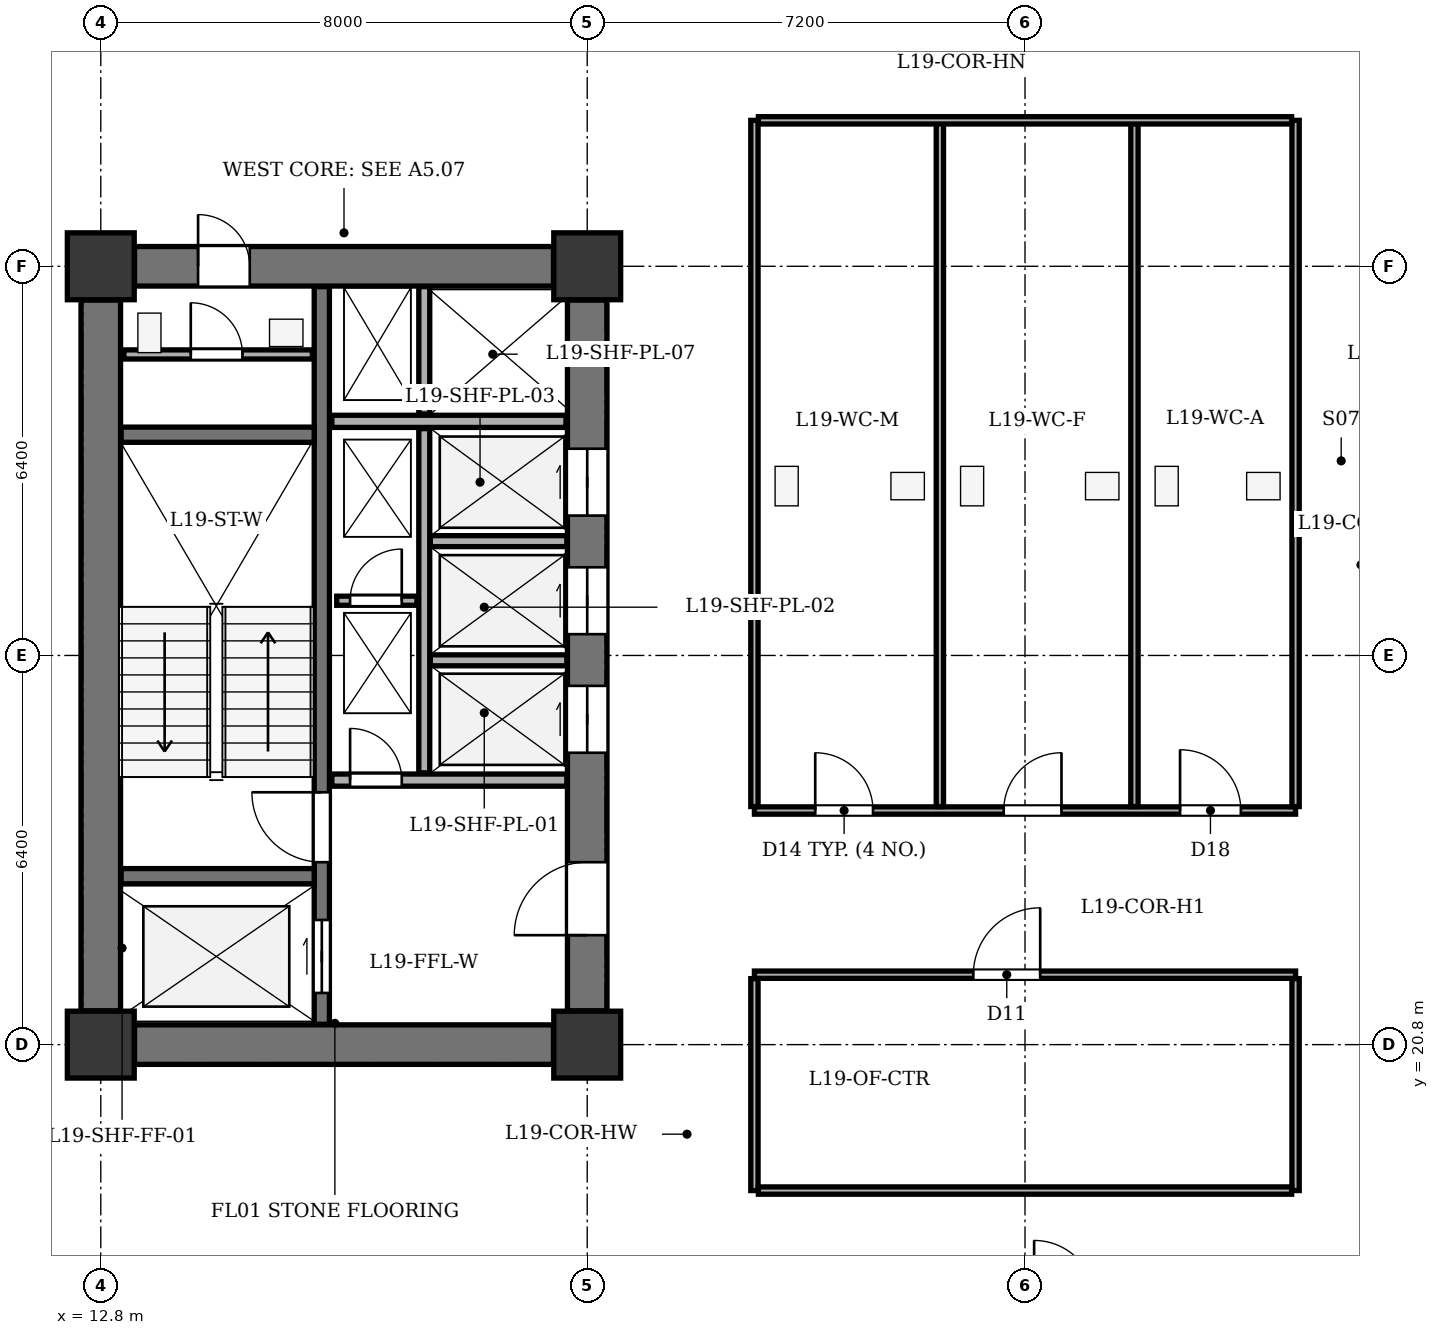
"""IFC4 building model, lengths in metres.
Left out: names, types, materials, properties, quantities, classifications, styles, units other than length and angle.
Written with IfcOpenShell. Run it as: python <this file> out.ifc"""

import sys

from ifc_helpers import new_model, si_unit, direction, frame, frame_2d, origin, origin_2d, place, context, subcontext, project, spatial, rectangle, extrude, element, fill, save


model = new_model("IFC4")
c1 = context("Model", 3, precision=1e-05, world=origin(), true_north=direction((0.0, 1.0)))
c2 = subcontext(c1, "Body", "Model", "MODEL_VIEW")
j1 = project(units=[si_unit("LENGTHUNIT", "METRE"), si_unit("PLANEANGLEUNIT", "RADIAN")], contexts=[c1])
p1 = place(None, origin())
s1 = spatial("IfcSite", under=j1, at=p1, CompositionType="ELEMENT")
p2 = place(p1, origin())
s2 = spatial("IfcBuilding", under=s1, at=p2, CompositionType="ELEMENT")
p3 = place(p2, frame((0.0, 0.0, 78.9)))
s3 = spatial("IfcBuildingStorey", under=s2, at=p3, CompositionType="ELEMENT", Elevation=78.9)
for number, where, z_axis, x_axis in (
    (1, (12.8, 20.8, 0.0), (0.0, 0.0, 1.0), (1.0, 0.0, 0.0)),
    (2, (20.8, 20.8, 0.0), (0.0, 0.0, 1.0), (1.0, 0.0, 0.0)),
    (3, (12.8, 33.6, 0.0), (0.0, 0.0, 1.0), (1.0, 0.0, 0.0)),
    (4, (20.8, 33.6, 0.0), (0.0, 0.0, 1.0), (1.0, 0.0, 0.0)),
):
    element("IfcColumn", number, at=place(p3, frame(where, z_axis=z_axis, x_axis=x_axis)), inside=s3, PredefinedType="COLUMN", context=c2, shape_type="SweptSolid", body=[
        extrude(rectangle(XDim=1.1, YDim=1.1, at=origin_2d()), origin(), (0.0, 0.0, 1.0), 3.9),
    ])
p4 = place(p3, frame((12.8, 21.355, 0.0), z_axis=(0.0, 0.0, 1.0), x_axis=(0.0, 1.0, 0.0)))
e5 = element("IfcWall", 5, at=p4, inside=s3, PredefinedType="SHEAR", context=c2, shape_type="SweptSolid", body=[
    extrude(rectangle(XDim=11.69, YDim=0.65, at=frame_2d((5.845, 0.0))), origin(), (0.0, 0.0, 1.0), 3.6),
])
p5 = place(p3, frame((13.355, 20.8, 0.0), z_axis=(0.0, 0.0, 1.0), x_axis=(1.0, 0.0, 0.0)))
e6 = element("IfcWall", 6, at=p5, inside=s3, PredefinedType="SHEAR", context=c2, shape_type="SweptSolid", body=[
    extrude(rectangle(XDim=6.89, YDim=0.65, at=frame_2d((3.445, 0.0))), origin(), (0.0, 0.0, 1.0), 3.6),
])
p6 = place(p3, frame((13.355, 33.6, 0.0), z_axis=(0.0, 0.0, 1.0), x_axis=(1.0, 0.0, 0.0)))
e7 = element("IfcWall", 7, at=p6, inside=s3, PredefinedType="SHEAR", context=c2, shape_type="SweptSolid", body=[
    extrude(rectangle(XDim=6.89, YDim=0.65, at=frame_2d((3.445, 0.0))), origin(), (0.0, 0.0, 1.0), 3.6),
])
p7 = place(p6, frame((1.045, 0.0, 0.0)))
e8 = element("IfcOpeningElement", 8, at=p7, cuts=e7, PredefinedType="OPENING", context=c2, shape_type="SweptSolid", body=[
    extrude(rectangle(XDim=0.85, YDim=2.02, at=frame_2d((0.425, 1.01))), frame((0.0, 0.335, 0.0), z_axis=(0.0, -1.0, 0.0), x_axis=(1.0, 0.0, 0.0)), (0.0, 0.0, 1.0), 0.67),
])
p8 = place(p3, frame((20.8, 21.355, 0.0), z_axis=(0.0, 0.0, 1.0), x_axis=(0.0, 1.0, 0.0)))
e9 = element("IfcWall", 9, at=p8, inside=s3, PredefinedType="SHEAR", context=c2, shape_type="SweptSolid", body=[
    extrude(rectangle(XDim=11.69, YDim=0.65, at=frame_2d((5.845, 0.0))), origin(), (0.0, 0.0, 1.0), 3.6),
])
p9 = place(p8, frame((1.245, 0.0, 0.0)))
e10 = element("IfcOpeningElement", 10, at=p9, cuts=e9, PredefinedType="OPENING", context=c2, shape_type="SweptSolid", body=[
    extrude(rectangle(XDim=1.2, YDim=2.15, at=frame_2d((0.6, 1.075))), frame((0.0, 0.335, 0.0), z_axis=(0.0, -1.0, 0.0), x_axis=(1.0, 0.0, 0.0)), (0.0, 0.0, 1.0), 0.67),
])
p10 = place(p8, frame((4.245, 0.0, 0.0)))
e11 = element("IfcOpeningElement", 11, at=p10, cuts=e9, PredefinedType="OPENING", context=c2, shape_type="SweptSolid", body=[
    extrude(rectangle(XDim=1.1, YDim=2.1, at=frame_2d((0.55, 1.05))), frame((0.0, 0.335, 0.0), z_axis=(0.0, -1.0, 0.0), x_axis=(1.0, 0.0, 0.0)), (0.0, 0.0, 1.0), 0.67),
])
p11 = place(p8, frame((6.195, 0.0, 0.0)))
e12 = element("IfcOpeningElement", 12, at=p11, cuts=e9, PredefinedType="OPENING", context=c2, shape_type="SweptSolid", body=[
    extrude(rectangle(XDim=1.1, YDim=2.1, at=frame_2d((0.55, 1.05))), frame((0.0, 0.335, 0.0), z_axis=(0.0, -1.0, 0.0), x_axis=(1.0, 0.0, 0.0)), (0.0, 0.0, 1.0), 0.67),
])
p12 = place(p8, frame((8.145, 0.0, 0.0)))
e13 = element("IfcOpeningElement", 13, at=p12, cuts=e9, PredefinedType="OPENING", context=c2, shape_type="SweptSolid", body=[
    extrude(rectangle(XDim=1.1, YDim=2.1, at=frame_2d((0.55, 1.05))), frame((0.0, 0.335, 0.0), z_axis=(0.0, -1.0, 0.0), x_axis=(1.0, 0.0, 0.0)), (0.0, 0.0, 1.0), 0.67),
])
p13 = place(p3, frame((16.435, 21.135, 0.0), z_axis=(0.0, 0.0, 1.0), x_axis=(0.0, 1.0, 0.0)))
e14 = element("IfcWall", 14, at=p13, inside=s3, PredefinedType="SHEAR", context=c2, shape_type="SweptSolid", body=[
    extrude(rectangle(XDim=12.13, YDim=0.25, at=frame_2d((6.065, 0.0))), origin(), (0.0, 0.0, 1.0), 3.6),
])
p14 = place(p13, frame((0.515, 0.0, 0.0)))
e15 = element("IfcOpeningElement", 15, at=p14, cuts=e14, PredefinedType="OPENING", context=c2, shape_type="SweptSolid", body=[
    extrude(rectangle(XDim=1.2, YDim=2.15, at=frame_2d((0.6, 1.075))), frame((0.0, 0.135, 0.0), z_axis=(0.0, -1.0, 0.0), x_axis=(1.0, 0.0, 0.0)), (0.0, 0.0, 1.0), 0.27),
])
p15 = place(p13, frame((2.665, 0.0, 0.0)))
e16 = element("IfcOpeningElement", 16, at=p15, cuts=e14, PredefinedType="OPENING", context=c2, shape_type="SweptSolid", body=[
    extrude(rectangle(XDim=1.15, YDim=2.15, at=frame_2d((0.575, 1.075))), frame((0.0, 0.135, 0.0), z_axis=(0.0, -1.0, 0.0), x_axis=(1.0, 0.0, 0.0)), (0.0, 0.0, 1.0), 0.27),
])
for number, where, z_axis, x_axis in (
    (17, (13.135, 23.57, 0.0), (0.0, 0.0, 1.0), (1.0, 0.0, 0.0)),
    (18, (13.135, 30.83, 0.0), (0.0, 0.0, 1.0), (1.0, 0.0, 0.0)),
):
    element("IfcWall", number, at=place(p3, frame(where, z_axis=z_axis, x_axis=x_axis)), inside=s3, PredefinedType="SHEAR", context=c2, shape_type="SweptSolid", body=[
        extrude(rectangle(XDim=3.175, YDim=0.25, at=frame_2d((1.587, 0.0))), origin(), (0.0, 0.0, 1.0), 3.6),
    ])
p16 = place(p3, frame((16.6, 25.15, 0.0), z_axis=(0.0, 0.0, 1.0), x_axis=(1.0, 0.0, 0.0)))
e19 = element("IfcWall", 19, at=p16, inside=s3, PredefinedType="SOLIDWALL", context=c2, shape_type="SweptSolid", body=[
    extrude(rectangle(XDim=3.865, YDim=0.2, at=frame_2d((1.933, 0.0))), origin(), (0.0, 0.0, 1.0), 3.6),
])
p17 = place(p16, frame((0.3, 0.0, 0.0)))
e20 = element("IfcOpeningElement", 20, at=p17, cuts=e19, PredefinedType="OPENING", context=c2, shape_type="SweptSolid", body=[
    extrude(rectangle(XDim=0.85, YDim=2.02, at=frame_2d((0.425, 1.01))), frame((0.0, 0.11, 0.0), z_axis=(0.0, -1.0, 0.0), x_axis=(1.0, 0.0, 0.0)), (0.0, 0.0, 1.0), 0.22),
])
p18 = place(p3, frame((16.6, 31.05, 0.0), z_axis=(0.0, 0.0, 1.0), x_axis=(1.0, 0.0, 0.0)))
e21 = element("IfcWall", 21, at=p18, inside=s3, PredefinedType="SOLIDWALL", context=c2, shape_type="SweptSolid", body=[
    extrude(rectangle(XDim=3.85, YDim=0.2, at=frame_2d((1.925, 0.0))), origin(), (0.0, 0.0, 1.0), 3.6),
])
p19 = place(p3, frame((18.12, 25.27, 0.0), z_axis=(0.0, 0.0, 1.0), x_axis=(0.0, 1.0, 0.0)))
e22 = element("IfcWall", 22, at=p19, inside=s3, PredefinedType="PARTITIONING", context=c2, shape_type="SweptSolid", body=[
    extrude(rectangle(XDim=5.66, YDim=0.18, at=frame_2d((2.83, 0.0))), origin(), (0.0, 0.0, 1.0), 3.6),
])
p20 = place(p3, frame((18.12, 31.17, 0.0), z_axis=(0.0, 0.0, 1.0), x_axis=(0.0, 1.0, 0.0)))
e23 = element("IfcWall", 23, at=p20, inside=s3, PredefinedType="PARTITIONING", context=c2, shape_type="SweptSolid", body=[
    extrude(rectangle(XDim=2.095, YDim=0.18, at=frame_2d((1.047, 0.0))), origin(), (0.0, 0.0, 1.0), 3.6),
])
for number, where, z_axis, x_axis in (
    (24, (18.22, 27.12, 0.0), (0.0, 0.0, 1.0), (1.0, 0.0, 0.0)),
    (25, (18.22, 29.08, 0.0), (0.0, 0.0, 1.0), (1.0, 0.0, 0.0)),
):
    element("IfcWall", number, at=place(p3, frame(where, z_axis=z_axis, x_axis=x_axis)), inside=s3, PredefinedType="PARTITIONING", context=c2, shape_type="SweptSolid", body=[
        extrude(rectangle(XDim=2.245, YDim=0.18, at=frame_2d((1.123, 0.0))), origin(), (0.0, 0.0, 1.0), 3.6),
    ])
p21 = place(p3, frame((13.18, 32.15, 0.0), z_axis=(0.0, 0.0, 1.0), x_axis=(1.0, 0.0, 0.0)))
e26 = element("IfcWall", 26, at=p21, inside=s3, PredefinedType="PARTITIONING", context=c2, shape_type="SweptSolid", body=[
    extrude(rectangle(XDim=3.1, YDim=0.15, at=frame_2d((1.55, 0.0))), origin(), (0.0, 0.0, 1.0), 3.6),
])
p22 = place(p21, frame((1.1, 0.0, 0.0)))
e27 = element("IfcOpeningElement", 27, at=p22, cuts=e26, PredefinedType="OPENING", context=c2, shape_type="SweptSolid", body=[
    extrude(rectangle(XDim=0.85, YDim=2.02, at=frame_2d((0.425, 1.01))), frame((0.0, 0.085, 0.0), z_axis=(0.0, -1.0, 0.0), x_axis=(1.0, 0.0, 0.0)), (0.0, 0.0, 1.0), 0.17),
])
p23 = place(p3, frame((16.68, 28.1, 0.0), z_axis=(0.0, 0.0, 1.0), x_axis=(1.0, 0.0, 0.0)))
e28 = element("IfcWall", 28, at=p23, inside=s3, PredefinedType="PARTITIONING", context=c2, shape_type="SweptSolid", body=[
    extrude(rectangle(XDim=1.32, YDim=0.15, at=frame_2d((0.66, 0.0))), origin(), (0.0, 0.0, 1.0), 3.6),
])
p24 = place(p23, frame((0.22, 0.0, 0.0)))
e29 = element("IfcOpeningElement", 29, at=p24, cuts=e28, PredefinedType="OPENING", context=c2, shape_type="SweptSolid", body=[
    extrude(rectangle(XDim=0.85, YDim=2.02, at=frame_2d((0.425, 1.01))), frame((0.0, 0.085, 0.0), z_axis=(0.0, -1.0, 0.0), x_axis=(1.0, 0.0, 0.0)), (0.0, 0.0, 1.0), 0.17),
])
p25 = place(p3, frame((23.55, 24.65, 0.0), z_axis=(0.0, 0.0, 1.0), x_axis=(1.0, 0.0, 0.0)))
e30 = element("IfcWall", 30, at=p25, inside=s3, PredefinedType="PARTITIONING", context=c2, shape_type="SweptSolid", body=[
    extrude(rectangle(XDim=8.9, YDim=0.12, at=frame_2d((4.45, 0.0))), origin(), (0.0, 0.0, 1.0), 3.135),
])
p26 = place(p25, frame((1.0, 0.0, 0.0)))
e31 = element("IfcOpeningElement", 31, at=p26, cuts=e30, PredefinedType="OPENING", context=c2, shape_type="SweptSolid", body=[
    extrude(rectangle(XDim=0.95, YDim=2.1, at=frame_2d((0.475, 1.05))), frame((0.0, 0.07, 0.0), z_axis=(0.0, -1.0, 0.0), x_axis=(1.0, 0.0, 0.0)), (0.0, 0.0, 1.0), 0.14),
])
p27 = place(p25, frame((4.1, 0.0, 0.0)))
e32 = element("IfcOpeningElement", 32, at=p27, cuts=e30, PredefinedType="OPENING", context=c2, shape_type="SweptSolid", body=[
    extrude(rectangle(XDim=0.95, YDim=2.1, at=frame_2d((0.475, 1.05))), frame((0.0, 0.07, 0.0), z_axis=(0.0, -1.0, 0.0), x_axis=(1.0, 0.0, 0.0)), (0.0, 0.0, 1.0), 0.14),
])
p28 = place(p25, frame((7.0, 0.0, 0.0)))
e33 = element("IfcOpeningElement", 33, at=p28, cuts=e30, PredefinedType="OPENING", context=c2, shape_type="SweptSolid", body=[
    extrude(rectangle(XDim=1.0, YDim=2.1, at=frame_2d((0.5, 1.05))), frame((0.0, 0.07, 0.0), z_axis=(0.0, -1.0, 0.0), x_axis=(1.0, 0.0, 0.0)), (0.0, 0.0, 1.0), 0.14),
])
for number, where, z_axis, x_axis in (
    (34, (23.55, 24.715, 0.0), (0.0, 0.0, 1.0), (0.0, 1.0, 0.0)),
    (35, (32.45, 24.715, 0.0), (0.0, 0.0, 1.0), (0.0, 1.0, 0.0)),
    (36, (26.6, 24.715, 0.0), (0.0, 0.0, 1.0), (0.0, 1.0, 0.0)),
):
    element("IfcWall", number, at=place(p3, frame(where, z_axis=z_axis, x_axis=x_axis)), inside=s3, PredefinedType="PARTITIONING", context=c2, shape_type="SweptSolid", body=[
        extrude(rectangle(XDim=11.285, YDim=0.12, at=frame_2d((5.643, 0.0))), origin(), (0.0, 0.0, 1.0), 3.6),
    ])
p29 = place(p3, frame((29.8, 24.715, 0.0), z_axis=(0.0, 0.0, 1.0), x_axis=(0.0, 1.0, 0.0)))
e37 = element("IfcWall", 37, at=p29, inside=s3, PredefinedType="PARTITIONING", context=c2, shape_type="SweptSolid", body=[
    extrude(rectangle(XDim=11.285, YDim=0.12, at=frame_2d((5.643, 0.0))), origin(), (0.0, 0.0, 1.0), 3.135),
])
p30 = place(p3, frame((23.615, 36.0, 0.0), z_axis=(0.0, 0.0, 1.0), x_axis=(1.0, 0.0, 0.0)))
e38 = element("IfcWall", 38, at=p30, inside=s3, PredefinedType="PARTITIONING", context=c2, shape_type="SweptSolid", body=[
    extrude(rectangle(XDim=8.77, YDim=0.12, at=frame_2d((4.385, 0.0))), origin(), (0.0, 0.0, 1.0), 3.6),
])
p31 = place(p3, frame((23.55, 21.95, 0.0), z_axis=(0.0, 0.0, 1.0), x_axis=(1.0, 0.0, 0.0)))
e39 = element("IfcWall", 39, at=p31, inside=s3, PredefinedType="PARTITIONING", context=c2, shape_type="SweptSolid", body=[
    extrude(rectangle(XDim=8.9, YDim=0.12, at=frame_2d((4.45, 0.0))), origin(), (0.0, 0.0, 1.0), 3.135),
])
p32 = place(p31, frame((3.6, 0.0, 0.0)))
e40 = element("IfcOpeningElement", 40, at=p32, cuts=e39, PredefinedType="OPENING", context=c2, shape_type="SweptSolid", body=[
    extrude(rectangle(XDim=1.1, YDim=2.15, at=frame_2d((0.55, 1.075))), frame((0.0, 0.07, 0.0), z_axis=(0.0, -1.0, 0.0), x_axis=(1.0, 0.0, 0.0)), (0.0, 0.0, 1.0), 0.14),
])
for number, where, z_axis, x_axis in (
    (41, (23.55, 18.4, 0.0), (0.0, 0.0, 1.0), (0.0, 1.0, 0.0)),
    (42, (32.45, 18.4, 0.0), (0.0, 0.0, 1.0), (0.0, 1.0, 0.0)),
):
    element("IfcWall", number, at=place(p3, frame(where, z_axis=z_axis, x_axis=x_axis)), inside=s3, PredefinedType="PARTITIONING", context=c2, shape_type="SweptSolid", body=[
        extrude(rectangle(XDim=3.485, YDim=0.12, at=frame_2d((1.743, 0.0))), origin(), (0.0, 0.0, 1.0), 3.6),
    ])
p33 = place(p3, frame((23.615, 18.4, 0.0), z_axis=(0.0, 0.0, 1.0), x_axis=(1.0, 0.0, 0.0)))
e43 = element("IfcWall", 43, at=p33, inside=s3, PredefinedType="PARTITIONING", context=c2, shape_type="SweptSolid", body=[
    extrude(rectangle(XDim=8.77, YDim=0.12, at=frame_2d((4.385, 0.0))), origin(), (0.0, 0.0, 1.0), 3.6),
])
p34 = place(p7, origin())
e44 = element("IfcDoor", 44, at=p34, inside=s3, OperationType="SINGLE_SWING_LEFT", PredefinedType="DOOR", context=c2, shape_type="SweptSolid", body=[
    extrude(rectangle(XDim=0.85, YDim=2.02, at=frame_2d((0.425, 1.01))), frame((0.0, 0.025, 0.0), z_axis=(0.0, -1.0, 0.0), x_axis=(1.0, 0.0, 0.0)), (0.0, 0.0, 1.0), 0.05),
])
fill(e8, e44)
p35 = place(p9, origin())
e45 = element("IfcDoor", 45, at=p35, inside=s3, OperationType="SINGLE_SWING_LEFT", PredefinedType="DOOR", context=c2, shape_type="SweptSolid", body=[
    extrude(rectangle(XDim=1.2, YDim=2.15, at=frame_2d((0.6, 1.075))), frame((0.0, 0.025, 0.0), z_axis=(0.0, -1.0, 0.0), x_axis=(1.0, 0.0, 0.0)), (0.0, 0.0, 1.0), 0.05),
])
fill(e10, e45)
p36 = place(p10, origin())
e46 = element("IfcDoor", 46, at=p36, inside=s3, OperationType="DOUBLE_DOOR_SLIDING", PredefinedType="DOOR", context=c2, shape_type="SweptSolid", body=[
    extrude(rectangle(XDim=1.1, YDim=2.1, at=frame_2d((0.55, 1.05))), frame((0.0, 0.025, 0.0), z_axis=(0.0, -1.0, 0.0), x_axis=(1.0, 0.0, 0.0)), (0.0, 0.0, 1.0), 0.05),
])
fill(e11, e46)
p37 = place(p11, origin())
e47 = element("IfcDoor", 47, at=p37, inside=s3, OperationType="DOUBLE_DOOR_SLIDING", PredefinedType="DOOR", context=c2, shape_type="SweptSolid", body=[
    extrude(rectangle(XDim=1.1, YDim=2.1, at=frame_2d((0.55, 1.05))), frame((0.0, 0.025, 0.0), z_axis=(0.0, -1.0, 0.0), x_axis=(1.0, 0.0, 0.0)), (0.0, 0.0, 1.0), 0.05),
])
fill(e12, e47)
p38 = place(p12, origin())
e48 = element("IfcDoor", 48, at=p38, inside=s3, OperationType="DOUBLE_DOOR_SLIDING", PredefinedType="DOOR", context=c2, shape_type="SweptSolid", body=[
    extrude(rectangle(XDim=1.1, YDim=2.1, at=frame_2d((0.55, 1.05))), frame((0.0, 0.025, 0.0), z_axis=(0.0, -1.0, 0.0), x_axis=(1.0, 0.0, 0.0)), (0.0, 0.0, 1.0), 0.05),
])
fill(e13, e48)
p39 = place(p14, origin())
e49 = element("IfcDoor", 49, at=p39, inside=s3, OperationType="DOUBLE_DOOR_SLIDING", PredefinedType="DOOR", context=c2, shape_type="SweptSolid", body=[
    extrude(rectangle(XDim=1.2, YDim=2.15, at=frame_2d((0.6, 1.075))), frame((0.0, 0.025, 0.0), z_axis=(0.0, -1.0, 0.0), x_axis=(1.0, 0.0, 0.0)), (0.0, 0.0, 1.0), 0.05),
])
fill(e15, e49)
p40 = place(p15, origin())
e50 = element("IfcDoor", 50, at=p40, inside=s3, OperationType="SINGLE_SWING_RIGHT", PredefinedType="DOOR", context=c2, shape_type="SweptSolid", body=[
    extrude(rectangle(XDim=1.15, YDim=2.15, at=frame_2d((0.575, 1.075))), frame((0.0, 0.025, 0.0), z_axis=(0.0, -1.0, 0.0), x_axis=(1.0, 0.0, 0.0)), (0.0, 0.0, 1.0), 0.05),
])
fill(e16, e50)
p41 = place(p17, origin())
e51 = element("IfcDoor", 51, at=p41, inside=s3, OperationType="SINGLE_SWING_LEFT", PredefinedType="DOOR", context=c2, shape_type="SweptSolid", body=[
    extrude(rectangle(XDim=0.85, YDim=2.02, at=frame_2d((0.425, 1.01))), frame((0.0, 0.025, 0.0), z_axis=(0.0, -1.0, 0.0), x_axis=(1.0, 0.0, 0.0)), (0.0, 0.0, 1.0), 0.05),
])
fill(e20, e51)
p42 = place(p22, origin())
e52 = element("IfcDoor", 52, at=p42, inside=s3, OperationType="SINGLE_SWING_LEFT", PredefinedType="DOOR", context=c2, shape_type="SweptSolid", body=[
    extrude(rectangle(XDim=0.85, YDim=2.02, at=frame_2d((0.425, 1.01))), frame((0.0, 0.025, 0.0), z_axis=(0.0, -1.0, 0.0), x_axis=(1.0, 0.0, 0.0)), (0.0, 0.0, 1.0), 0.05),
])
fill(e27, e52)
p43 = place(p24, origin())
e53 = element("IfcDoor", 53, at=p43, inside=s3, OperationType="SINGLE_SWING_RIGHT", PredefinedType="DOOR", context=c2, shape_type="SweptSolid", body=[
    extrude(rectangle(XDim=0.85, YDim=2.02, at=frame_2d((0.425, 1.01))), frame((0.0, 0.025, 0.0), z_axis=(0.0, -1.0, 0.0), x_axis=(1.0, 0.0, 0.0)), (0.0, 0.0, 1.0), 0.05),
])
fill(e29, e53)
p44 = place(p26, origin())
e54 = element("IfcDoor", 54, at=p44, inside=s3, OperationType="SINGLE_SWING_LEFT", PredefinedType="DOOR", context=c2, shape_type="SweptSolid", body=[
    extrude(rectangle(XDim=0.95, YDim=2.1, at=frame_2d((0.475, 1.05))), frame((0.0, 0.025, 0.0), z_axis=(0.0, -1.0, 0.0), x_axis=(1.0, 0.0, 0.0)), (0.0, 0.0, 1.0), 0.05),
])
fill(e31, e54)
p45 = place(p27, origin())
e55 = element("IfcDoor", 55, at=p45, inside=s3, OperationType="SINGLE_SWING_RIGHT", PredefinedType="DOOR", context=c2, shape_type="SweptSolid", body=[
    extrude(rectangle(XDim=0.95, YDim=2.1, at=frame_2d((0.475, 1.05))), frame((0.0, 0.025, 0.0), z_axis=(0.0, -1.0, 0.0), x_axis=(1.0, 0.0, 0.0)), (0.0, 0.0, 1.0), 0.05),
])
fill(e32, e55)
p46 = place(p28, origin())
e56 = element("IfcDoor", 56, at=p46, inside=s3, OperationType="SINGLE_SWING_LEFT", PredefinedType="DOOR", context=c2, shape_type="SweptSolid", body=[
    extrude(rectangle(XDim=1.0, YDim=2.1, at=frame_2d((0.5, 1.05))), frame((0.0, 0.025, 0.0), z_axis=(0.0, -1.0, 0.0), x_axis=(1.0, 0.0, 0.0)), (0.0, 0.0, 1.0), 0.05),
])
fill(e33, e56)
p47 = place(p32, origin())
e57 = element("IfcDoor", 57, at=p47, inside=s3, OperationType="SINGLE_SWING_RIGHT", PredefinedType="DOOR", context=c2, shape_type="SweptSolid", body=[
    extrude(rectangle(XDim=1.1, YDim=2.15, at=frame_2d((0.55, 1.075))), frame((0.0, 0.025, 0.0), z_axis=(0.0, -1.0, 0.0), x_axis=(1.0, 0.0, 0.0)), (0.0, 0.0, 1.0), 0.05),
])
fill(e40, e57)
save(model, sys.argv[1])
